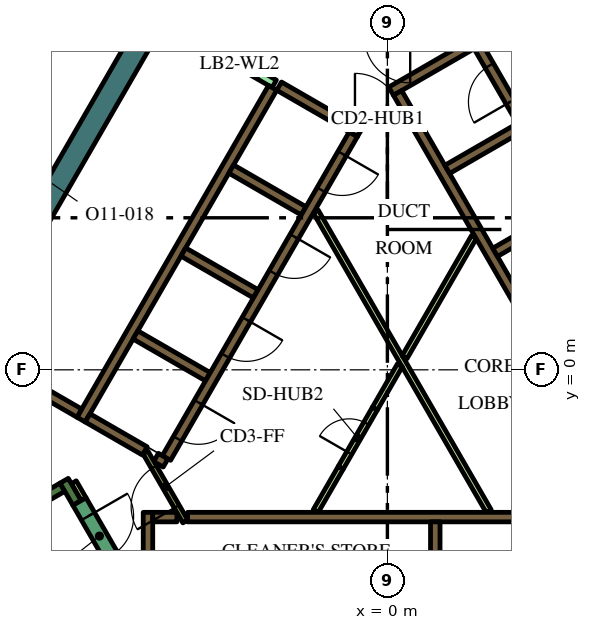
"""IFC4 building model, lengths in metres.
Left out: names, types, materials, properties, quantities, classifications, styles, units other than length and angle.
Written with IfcOpenShell. Run it as: python <this file> out.ifc"""

import sys

from ifc_helpers import new_model, si_unit, direction, frame, frame_2d, origin, place, context, subcontext, project, spatial, polyline, rectangle, outline, extrude, element, fill, save


model = new_model("IFC4")
c1 = context("Model", 3, precision=1e-05, world=origin(), true_north=direction((0.0, 1.0)))
c2 = subcontext(c1, "Body", "Model", "MODEL_VIEW")
j1 = project(units=[si_unit("LENGTHUNIT", "METRE"), si_unit("PLANEANGLEUNIT", "RADIAN")], contexts=[c1])
p1 = place(None, origin())
s1 = spatial("IfcSite", under=j1, at=p1, CompositionType="ELEMENT")
p2 = place(p1, origin())
s2 = spatial("IfcBuilding", under=s1, at=p2, CompositionType="ELEMENT")
p3 = place(p2, frame((0.0, 0.0, 275.4)))
s3 = spatial("IfcBuildingStorey", under=s2, at=p3, CompositionType="ELEMENT", Elevation=275.4)
p4 = place(p3, frame((1.989, 16.456, 0.0), z_axis=(0.0, 0.0, 1.0), x_axis=(0.49999102663, -0.8660305845, 0.0)))
e1 = element("IfcWall", 1, at=p4, inside=s3, PredefinedType="SOLIDWALL", context=c2, shape_type="SweptSolid", body=[
    extrude(rectangle(XDim=12.406, YDim=0.6, at=frame_2d((6.203, 0.0))), origin(), (0.0, 0.0, 1.0), 4.2),
])
p5 = place(p3, frame((-4.234, 12.566, 0.0), z_axis=(0.0, 0.0, 1.0), x_axis=(-0.499998841866, -0.866026072432, 0.0)))
e2 = element("IfcWall", 2, at=p5, inside=s3, PredefinedType="SOLIDWALL", context=c2, shape_type="SweptSolid", body=[
    extrude(rectangle(XDim=16.694, YDim=0.6, at=frame_2d((8.347, 0.0))), origin(), (0.0, 0.0, 1.0), 4.2),
])
p6 = place(p3, frame((-14.44, -6.49, 0.0), z_axis=(0.0, 0.0, 1.0), x_axis=(0.866022966069, 0.500004222222, 0.0)))
e3 = element("IfcWall", 3, at=p6, inside=s3, PredefinedType="SOLIDWALL", context=c2, shape_type="SweptSolid", body=[
    extrude(rectangle(XDim=6.8, YDim=0.25, at=frame_2d((3.4, 0.0))), origin(), (0.0, 0.0, 1.0), 4.2),
])
p7 = place(p3, frame((-8.168, -3.503, 0.0), z_axis=(0.0, 0.0, 1.0), x_axis=(-0.499952099219, 0.866053057547, 0.0)))
e4 = element("IfcWall", 4, at=p7, inside=s3, PredefinedType="SOLIDWALL", context=c2, shape_type="SweptSolid", body=[
    extrude(rectangle(XDim=0.675, YDim=0.25, at=frame_2d((0.337, 0.0))), origin(), (0.0, 0.0, 1.0), 4.2),
])
p8 = place(p3, frame((-5.259, -3.875, 0.0), z_axis=(0.0, 0.0, 1.0), x_axis=(1.0, 0.0, 0.0)))
e5 = element("IfcWall", 5, at=p8, inside=s3, PredefinedType="SOLIDWALL", context=c2, shape_type="SweptSolid", body=[
    extrude(rectangle(XDim=10.489, YDim=0.25, at=frame_2d((5.244, 0.0))), origin(), (0.0, 0.0, 1.0), 4.2),
])
p9 = place(p3, frame((1.26, -4.0, 0.0), z_axis=(0.0, 0.0, 1.0), x_axis=(0.0, -1.0, 0.0)))
e6 = element("IfcWall", 6, at=p9, inside=s3, PredefinedType="SOLIDWALL", context=c2, shape_type="SweptSolid", body=[
    extrude(rectangle(XDim=2.2, YDim=0.25, at=frame_2d((1.1, 0.0))), origin(), (0.0, 0.0, 1.0), 4.2),
])
p10 = place(p3, frame((-6.3, -7.125, 0.0), z_axis=(0.0, 0.0, 1.0), x_axis=(0.0, 1.0, 0.0)))
e7 = element("IfcWall", 7, at=p10, inside=s3, PredefinedType="SOLIDWALL", context=c2, shape_type="SweptSolid", body=[
    extrude(rectangle(XDim=3.375, YDim=0.25, at=frame_2d((1.687, 0.0))), origin(), (0.0, 0.0, 1.0), 4.2),
])
p11 = place(p3, frame((-6.175, -3.875, 0.0), z_axis=(0.0, 0.0, 1.0), x_axis=(1.0, 0.0, 0.0)))
e8 = element("IfcWall", 8, at=p11, inside=s3, PredefinedType="SOLIDWALL", context=c2, shape_type="SweptSolid", body=[
    extrude(rectangle(XDim=0.637, YDim=0.25, at=frame_2d((0.318, 0.0))), origin(), (0.0, 0.0, 1.0), 4.2),
])
p12 = place(p3, frame((3.1, 9.064, 0.0), z_axis=(0.0, 0.0, 1.0), x_axis=(-0.866033137035, -0.499986605379, 0.0)))
e9 = element("IfcWall", 9, at=p12, inside=s3, PredefinedType="SOLIDWALL", context=c2, shape_type="SweptSolid", body=[
    extrude(rectangle(XDim=3.467, YDim=0.25, at=frame_2d((1.733, 0.0))), origin(), (0.0, 0.0, 1.0), 4.2),
])
p13 = place(p3, frame((0.268, 7.285, 0.0), z_axis=(0.0, 0.0, 1.0), x_axis=(0.500098681536, -0.865968422476, 0.0)))
e10 = element("IfcWall", 10, at=p13, inside=s3, PredefinedType="SOLIDWALL", context=c2, shape_type="SweptSolid", body=[
    extrude(rectangle(XDim=0.636, YDim=0.25, at=frame_2d((0.318, 0.0))), origin(), (0.0, 0.0, 1.0), 4.2),
])
p14 = place(p3, frame((5.97, -2.591, 0.0), z_axis=(0.0, 0.0, 1.0), x_axis=(-0.499994469932, 0.866028596547, 0.0)))
e11 = element("IfcWall", 11, at=p14, inside=s3, PredefinedType="SOLIDWALL", context=c2, shape_type="SweptSolid", body=[
    extrude(rectangle(XDim=10.488, YDim=0.25, at=frame_2d((5.244, 0.0))), origin(), (0.0, 0.0, 1.0), 4.2),
])
p15 = place(p3, frame((1.574, 5.274, 0.0), z_axis=(0.0, 0.0, 1.0), x_axis=(0.866028486751, 0.499994660107, 0.0)))
e12 = element("IfcWall", 12, at=p15, inside=s3, PredefinedType="SOLIDWALL", context=c2, shape_type="SweptSolid", body=[
    extrude(rectangle(XDim=2.2, YDim=0.25, at=frame_2d((1.1, 0.0))), origin(), (0.0, 0.0, 1.0), 4.2),
])
p16 = place(p3, frame((2.834, 3.091, 0.0), z_axis=(0.0, 0.0, 1.0), x_axis=(0.866008176907, 0.50002983664, 0.0)))
e13 = element("IfcWall", 13, at=p16, inside=s3, PredefinedType="SOLIDWALL", context=c2, shape_type="SweptSolid", body=[
    extrude(rectangle(XDim=2.2, YDim=0.25, at=frame_2d((1.1, 0.0))), origin(), (0.0, 0.0, 1.0), 4.2),
])
p17 = place(p3, frame((-3.02, 7.419, 0.0), z_axis=(0.0, 0.0, 1.0), x_axis=(-0.500022956343, -0.866012149528, 0.0)))
e14 = element("IfcWall", 14, at=p17, inside=s3, PredefinedType="SOLIDWALL", context=c2, shape_type="SweptSolid", body=[
    extrude(rectangle(XDim=10.08, YDim=0.25, at=frame_2d((5.04, 0.0))), origin(), (0.0, 0.0, 1.0), 4.2),
])
p18 = place(p3, origin())
e15 = element("IfcWall", 15, at=p18, inside=s3, PredefinedType="SOLIDWALL", context=c2, shape_type="SweptSolid", body=[
    extrude(outline(polyline([(-2.912, 7.356), (-2.787, 7.573), (-1.232, 6.675), (-1.303, 6.675), (-1.304, 6.675), (-1.304, 6.675), (-1.304, 6.525), (-1.304, 6.525), (-1.303, 6.525), (-0.971, 6.525), (-0.665, 6.348), (-0.79, 6.132), (-1.007, 6.257), (-1.007, 6.257), (-2.912, 7.356)])), origin(), (0.0, 0.0, 1.0), 4.2),
])
for number, where, z_axis, x_axis in (
    (16, (-2.204, 4.182, 0.0), (0.0, 0.0, 1.0), (-0.866, 0.5, 0.0)),
    (17, (-5.369, 3.1, 0.0), (0.0, 0.0, 1.0), (0.866, -0.5, 0.0)),
    (18, (-4.724, -0.182, 0.0), (0.0, 0.0, 1.0), (-0.866, 0.5, 0.0)),
):
    element("IfcWall", number, at=place(p3, frame(where, z_axis=z_axis, x_axis=x_axis)), inside=s3, PredefinedType="SOLIDWALL", context=c2, shape_type="SweptSolid", body=[
        extrude(rectangle(XDim=2.2, YDim=0.25, at=frame_2d((1.1, 0.0))), origin(), (0.0, 0.0, 1.0), 4.2),
    ])
p19 = place(p3, frame((-6.088, -2.305, 0.0), z_axis=(0.0, 0.0, 1.0), x_axis=(0.866059450854, -0.499941024108, 0.0)))
e19 = element("IfcWall", 19, at=p19, inside=s3, PredefinedType="SOLIDWALL", context=c2, shape_type="SweptSolid", body=[
    extrude(rectangle(XDim=0.29, YDim=0.25, at=frame_2d((0.145, 0.0))), origin(), (0.0, 0.0, 1.0), 4.2),
])
p20 = place(p3, frame((-7.889, -1.265, 0.0), z_axis=(0.0, 0.0, 1.0), x_axis=(0.865986741702, -0.500066958712, 0.0)))
e20 = element("IfcWall", 20, at=p20, inside=s3, PredefinedType="SOLIDWALL", context=c2, shape_type="SweptSolid", body=[
    extrude(rectangle(XDim=1.738, YDim=0.25, at=frame_2d((0.869, 0.0))), origin(), (0.0, 0.0, 1.0), 4.2),
])
p21 = place(p3, frame((-8.106, -1.14, 0.0), z_axis=(0.0, 0.0, 1.0), x_axis=(-0.866008981251, 0.500028443584, 0.0)))
e21 = element("IfcWall", 21, at=p21, inside=s3, PredefinedType="SOLIDWALL", context=c2, shape_type="SweptSolid", body=[
    extrude(rectangle(XDim=3.2, YDim=0.25, at=frame_2d((1.6, 0.0))), origin(), (0.0, 0.0, 1.0), 4.2),
])
p22 = place(p3, frame((-8.252, -2.958, 0.0), z_axis=(0.0, 0.0, 1.0), x_axis=(0.500174715838, -0.865924508047, 0.0)))
e22 = element("IfcWall", 22, at=p22, inside=s3, PredefinedType="PARTITIONING", context=c2, shape_type="SweptSolid", body=[
    extrude(rectangle(XDim=0.514, YDim=0.15, at=frame_2d((0.257, 0.0))), origin(), (0.0, 0.0, 1.0), 3.55),
])
p23 = place(p3, frame((-1.887, 4.168, 0.0), z_axis=(0.0, 0.0, 1.0), x_axis=(0.499997069472, -0.866027095719, 0.0)))
e23 = element("IfcWall", 23, at=p23, inside=s3, PredefinedType="PARTITIONING", context=c2, shape_type="SweptSolid", body=[
    extrude(rectangle(XDim=9.106, YDim=0.15, at=frame_2d((4.553, 0.0))), origin(), (0.0, 0.0, 1.0), 3.55),
])
p24 = place(p3, frame((-0.329, -1.021, 0.0), z_axis=(0.0, 0.0, 1.0), x_axis=(0.500033191285, 0.866006239939, 0.0)))
e24 = element("IfcWall", 24, at=p24, inside=s3, PredefinedType="PARTITIONING", context=c2, shape_type="SweptSolid", body=[
    extrude(rectangle(XDim=1.315, YDim=0.15, at=frame_2d((0.657, 0.0))), origin(), (0.0, 0.0, 1.0), 3.55),
])
p25 = place(p3, frame((2.277, 3.493, 0.0), z_axis=(0.0, 0.0, 1.0), x_axis=(-0.499994550825, -0.866028549844, 0.0)))
e25 = element("IfcWall", 25, at=p25, inside=s3, PredefinedType="PARTITIONING", context=c2, shape_type="SweptSolid", body=[
    extrude(rectangle(XDim=3.65, YDim=0.15, at=frame_2d((1.825, 0.0))), origin(), (0.0, 0.0, 1.0), 3.55),
])
p26 = place(p3, frame((-1.887, -3.718, 0.0), z_axis=(0.0, 0.0, 1.0), x_axis=(0.500033191285, 0.866006239939, 0.0)))
e26 = element("IfcWall", 26, at=p26, inside=s3, PredefinedType="PARTITIONING", context=c2, shape_type="SweptSolid", body=[
    extrude(rectangle(XDim=1.315, YDim=0.15, at=frame_2d((0.657, 0.0))), origin(), (0.0, 0.0, 1.0), 3.55),
])
p27 = place(p3, frame((8.565, -2.185, 0.0), z_axis=(0.0, 0.0, 1.0), x_axis=(-0.499997954832, 0.866026584559, 0.0)))
e27 = element("IfcWall", 27, at=p27, inside=s3, PredefinedType="SOLIDWALL", context=c2, shape_type="SweptSolid", body=[
    extrude(rectangle(XDim=12.35, YDim=0.25, at=frame_2d((6.175, 0.0))), origin(), (0.0, 0.0, 1.0), 4.2),
])
p28 = place(p27, frame((0.685, 0.0, 0.0)))
e28 = element("IfcOpeningElement", 28, at=p28, cuts=e27, PredefinedType="OPENING", context=c2, shape_type="SweptSolid", body=[
    extrude(rectangle(XDim=0.9, YDim=2.1, at=frame_2d((0.45, 1.05))), frame((0.0, 0.135, 0.0), z_axis=(0.0, -1.0, 0.0), x_axis=(1.0, 0.0, 0.0)), (0.0, 0.0, 1.0), 0.27),
])
p29 = place(p27, frame((3.105, 0.0, 0.0)))
e29 = element("IfcOpeningElement", 29, at=p29, cuts=e27, PredefinedType="OPENING", context=c2, shape_type="SweptSolid", body=[
    extrude(rectangle(XDim=1.1, YDim=2.1, at=frame_2d((0.55, 1.05))), frame((0.0, 0.135, 0.0), z_axis=(0.0, -1.0, 0.0), x_axis=(1.0, 0.0, 0.0)), (0.0, 0.0, 1.0), 0.27),
])
p30 = place(p27, frame((5.625, 0.0, 0.0)))
e30 = element("IfcOpeningElement", 30, at=p30, cuts=e27, PredefinedType="OPENING", context=c2, shape_type="SweptSolid", body=[
    extrude(rectangle(XDim=1.1, YDim=2.1, at=frame_2d((0.55, 1.05))), frame((0.0, 0.135, 0.0), z_axis=(0.0, -1.0, 0.0), x_axis=(1.0, 0.0, 0.0)), (0.0, 0.0, 1.0), 0.27),
])
p31 = place(p27, frame((8.145, 0.0, 0.0)))
e31 = element("IfcOpeningElement", 31, at=p31, cuts=e27, PredefinedType="OPENING", context=c2, shape_type="SweptSolid", body=[
    extrude(rectangle(XDim=1.1, YDim=2.1, at=frame_2d((0.55, 1.05))), frame((0.0, 0.135, 0.0), z_axis=(0.0, -1.0, 0.0), x_axis=(1.0, 0.0, 0.0)), (0.0, 0.0, 1.0), 0.27),
])
p32 = place(p27, frame((10.665, 0.0, 0.0)))
e32 = element("IfcOpeningElement", 32, at=p32, cuts=e27, PredefinedType="OPENING", context=c2, shape_type="SweptSolid", body=[
    extrude(rectangle(XDim=1.1, YDim=2.1, at=frame_2d((0.55, 1.05))), frame((0.0, 0.135, 0.0), z_axis=(0.0, -1.0, 0.0), x_axis=(1.0, 0.0, 0.0)), (0.0, 0.0, 1.0), 0.27),
])
p33 = place(p3, frame((-0.898, 6.194, 0.0), z_axis=(0.0, 0.0, 1.0), x_axis=(-0.499996202215, -0.866027596426, 0.0)))
e33 = element("IfcWall", 33, at=p33, inside=s3, PredefinedType="SOLIDWALL", context=c2, shape_type="SweptSolid", body=[
    extrude(rectangle(XDim=9.83, YDim=0.25, at=frame_2d((4.915, 0.0))), origin(), (0.0, 0.0, 1.0), 4.2),
])
p34 = place(p33, frame((0.585, 0.0, 0.0)))
e34 = element("IfcOpeningElement", 34, at=p34, cuts=e33, PredefinedType="OPENING", context=c2, shape_type="SweptSolid", body=[
    extrude(rectangle(XDim=1.1, YDim=2.1, at=frame_2d((0.55, 1.05))), frame((0.0, 0.135, 0.0), z_axis=(0.0, -1.0, 0.0), x_axis=(1.0, 0.0, 0.0)), (0.0, 0.0, 1.0), 0.27),
])
p35 = place(p33, frame((3.105, 0.0, 0.0)))
e35 = element("IfcOpeningElement", 35, at=p35, cuts=e33, PredefinedType="OPENING", context=c2, shape_type="SweptSolid", body=[
    extrude(rectangle(XDim=1.1, YDim=2.1, at=frame_2d((0.55, 1.05))), frame((0.0, 0.135, 0.0), z_axis=(0.0, -1.0, 0.0), x_axis=(1.0, 0.0, 0.0)), (0.0, 0.0, 1.0), 0.27),
])
p36 = place(p33, frame((5.625, 0.0, 0.0)))
e36 = element("IfcOpeningElement", 36, at=p36, cuts=e33, PredefinedType="OPENING", context=c2, shape_type="SweptSolid", body=[
    extrude(rectangle(XDim=1.1, YDim=2.1, at=frame_2d((0.55, 1.05))), frame((0.0, 0.135, 0.0), z_axis=(0.0, -1.0, 0.0), x_axis=(1.0, 0.0, 0.0)), (0.0, 0.0, 1.0), 0.27),
])
p37 = place(p33, frame((8.145, 0.0, 0.0)))
e37 = element("IfcOpeningElement", 37, at=p37, cuts=e33, PredefinedType="OPENING", context=c2, shape_type="SweptSolid", body=[
    extrude(rectangle(XDim=1.1, YDim=2.1, at=frame_2d((0.55, 1.05))), frame((0.0, 0.135, 0.0), z_axis=(0.0, -1.0, 0.0), x_axis=(1.0, 0.0, 0.0)), (0.0, 0.0, 1.0), 0.27),
])
p38 = place(p3, frame((-8.103, -3.466, 0.0), z_axis=(0.0, 0.0, 1.0), x_axis=(0.500078061341, -0.865980330357, 0.0)))
e38 = element("IfcWall", 38, at=p38, inside=s3, PredefinedType="SOLIDWALL", context=c2, shape_type="SweptSolid", body=[
    extrude(rectangle(XDim=2.1, YDim=0.4, at=frame_2d((1.05, 0.0))), origin(), (0.0, 0.0, 1.0), 4.2),
])
p39 = place(p38, frame((0.45, 0.0, 0.0)))
e39 = element("IfcOpeningElement", 39, at=p39, cuts=e38, PredefinedType="OPENING", context=c2, shape_type="SweptSolid", body=[
    extrude(rectangle(XDim=1.2, YDim=2.1, at=frame_2d((0.6, 1.05))), frame((0.0, 0.21, 0.0), z_axis=(0.0, -1.0, 0.0), x_axis=(1.0, 0.0, 0.0)), (0.0, 0.0, 1.0), 0.42),
])
p40 = place(p3, frame((-1.303, 6.6, 0.0), z_axis=(0.0, 0.0, 1.0), x_axis=(1.0, 0.0, 0.0)))
e40 = element("IfcWall", 40, at=p40, inside=s3, PredefinedType="PARTITIONING", context=c2, shape_type="SweptSolid", body=[
    extrude(rectangle(XDim=2.1, YDim=0.15, at=frame_2d((1.05, 0.0))), origin(), (0.0, 0.0, 1.0), 4.2),
])
p41 = place(p40, frame((0.45, 0.0, 0.0)))
e41 = element("IfcOpeningElement", 41, at=p41, cuts=e40, PredefinedType="OPENING", context=c2, shape_type="SweptSolid", body=[
    extrude(rectangle(XDim=1.2, YDim=2.1, at=frame_2d((0.6, 1.05))), frame((0.0, 0.085, 0.0), z_axis=(0.0, -1.0, 0.0), x_axis=(1.0, 0.0, 0.0)), (0.0, 0.0, 1.0), 0.17),
])
p42 = place(p3, frame((-5.317, -3.99, 0.0), z_axis=(0.0, 0.0, 1.0), x_axis=(-0.500027713859, 0.866009402589, 0.0)))
e42 = element("IfcWall", 42, at=p42, inside=s3, PredefinedType="PARTITIONING", context=c2, shape_type="SweptSolid", body=[
    extrude(rectangle(XDim=2.1, YDim=0.15, at=frame_2d((1.05, 0.0))), origin(), (0.0, 0.0, 1.0), 4.2),
])
p43 = place(p42, frame((0.45, 0.0, 0.0)))
e43 = element("IfcOpeningElement", 43, at=p43, cuts=e42, PredefinedType="OPENING", context=c2, shape_type="SweptSolid", body=[
    extrude(rectangle(XDim=1.2, YDim=2.1, at=frame_2d((0.6, 1.05))), frame((0.0, 0.085, 0.0), z_axis=(0.0, -1.0, 0.0), x_axis=(1.0, 0.0, 0.0)), (0.0, 0.0, 1.0), 0.17),
])
p44 = place(p3, frame((-4.796, 8.575, 0.0), z_axis=(0.0, 0.0, 1.0), x_axis=(0.866009402589, -0.500027713859, 0.0)))
e44 = element("IfcWall", 44, at=p44, inside=s3, PredefinedType="PARTITIONING", context=c2, shape_type="SweptSolid", body=[
    extrude(rectangle(XDim=2.1, YDim=0.226, at=frame_2d((1.05, 0.0))), origin(), (0.0, 0.0, 1.0), 3.55),
])
p45 = place(p44, frame((0.45, 0.0, 0.0)))
e45 = element("IfcOpeningElement", 45, at=p45, cuts=e44, PredefinedType="OPENING", context=c2, shape_type="SweptSolid", body=[
    extrude(rectangle(XDim=1.2, YDim=2.1, at=frame_2d((0.6, 1.05))), frame((0.0, 0.123, 0.0), z_axis=(0.0, -1.0, 0.0), x_axis=(1.0, 0.0, 0.0)), (0.0, 0.0, 1.0), 0.246),
])
p46 = place(p3, frame((-1.229, -2.579, 0.0), z_axis=(0.0, 0.0, 1.0), x_axis=(0.500062916607, 0.865989075817, 0.0)))
e46 = element("IfcWall", 46, at=p46, inside=s3, PredefinedType="PARTITIONING", context=c2, shape_type="SweptSolid", body=[
    extrude(rectangle(XDim=1.8, YDim=0.15, at=frame_2d((0.9, 0.0))), origin(), (0.0, 0.0, 1.0), 3.55),
])
p47 = place(p46, frame((0.45, 0.0, 0.0)))
e47 = element("IfcOpeningElement", 47, at=p47, cuts=e46, PredefinedType="OPENING", context=c2, shape_type="SweptSolid", body=[
    extrude(rectangle(XDim=0.9, YDim=2.1, at=frame_2d((0.45, 1.05))), frame((0.0, 0.085, 0.0), z_axis=(0.0, -1.0, 0.0), x_axis=(1.0, 0.0, 0.0)), (0.0, 0.0, 1.0), 0.17),
])
p48 = place(p3, frame((-7.436, 11.221, 0.0), z_axis=(0.0, 0.0, 1.0), x_axis=(-0.49999894854, -0.866026010844, 0.0)))
e48 = element("IfcWall", 48, at=p48, inside=s3, PredefinedType="PARTITIONING", context=c2, shape_type="SweptSolid", body=[
    extrude(rectangle(XDim=12.0, YDim=0.2, at=frame_2d((6.0, 0.0))), origin(), (0.0, 0.0, 1.0), 3.55),
])
p49 = place(p48, frame((5.5, 0.0, 0.0)))
e49 = element("IfcOpeningElement", 49, at=p49, cuts=e48, PredefinedType="OPENING", context=c2, shape_type="SweptSolid", body=[
    extrude(rectangle(XDim=1.0, YDim=2.1, at=frame_2d((0.5, 1.05))), frame((0.0, 0.11, 0.0), z_axis=(0.0, -1.0, 0.0), x_axis=(1.0, 0.0, 0.0)), (0.0, 0.0, 1.0), 0.22),
])
p50 = place(p32, origin())
e50 = element("IfcDoor", 50, at=p50, inside=s3, OperationType="DOUBLE_DOOR_SLIDING", PredefinedType="DOOR", context=c2, shape_type="SweptSolid", body=[
    extrude(rectangle(XDim=1.1, YDim=2.1, at=frame_2d((0.55, 1.05))), frame((0.0, 0.025, 0.0), z_axis=(0.0, -1.0, 0.0), x_axis=(1.0, 0.0, 0.0)), (0.0, 0.0, 1.0), 0.05),
])
fill(e32, e50)
p51 = place(p34, origin())
e51 = element("IfcDoor", 51, at=p51, inside=s3, OperationType="DOUBLE_DOOR_SLIDING", PredefinedType="DOOR", context=c2, shape_type="SweptSolid", body=[
    extrude(rectangle(XDim=1.1, YDim=2.1, at=frame_2d((0.55, 1.05))), frame((0.0, 0.025, 0.0), z_axis=(0.0, -1.0, 0.0), x_axis=(1.0, 0.0, 0.0)), (0.0, 0.0, 1.0), 0.05),
])
fill(e34, e51)
p52 = place(p35, origin())
e52 = element("IfcDoor", 52, at=p52, inside=s3, OperationType="DOUBLE_DOOR_SLIDING", PredefinedType="DOOR", context=c2, shape_type="SweptSolid", body=[
    extrude(rectangle(XDim=1.1, YDim=2.1, at=frame_2d((0.55, 1.05))), frame((0.0, 0.025, 0.0), z_axis=(0.0, -1.0, 0.0), x_axis=(1.0, 0.0, 0.0)), (0.0, 0.0, 1.0), 0.05),
])
fill(e35, e52)
p53 = place(p36, origin())
e53 = element("IfcDoor", 53, at=p53, inside=s3, OperationType="DOUBLE_DOOR_SLIDING", PredefinedType="DOOR", context=c2, shape_type="SweptSolid", body=[
    extrude(rectangle(XDim=1.1, YDim=2.1, at=frame_2d((0.55, 1.05))), frame((0.0, 0.025, 0.0), z_axis=(0.0, -1.0, 0.0), x_axis=(1.0, 0.0, 0.0)), (0.0, 0.0, 1.0), 0.05),
])
fill(e36, e53)
p54 = place(p37, origin())
e54 = element("IfcDoor", 54, at=p54, inside=s3, OperationType="DOUBLE_DOOR_SLIDING", PredefinedType="DOOR", context=c2, shape_type="SweptSolid", body=[
    extrude(rectangle(XDim=1.1, YDim=2.1, at=frame_2d((0.55, 1.05))), frame((0.0, 0.025, 0.0), z_axis=(0.0, -1.0, 0.0), x_axis=(1.0, 0.0, 0.0)), (0.0, 0.0, 1.0), 0.05),
])
fill(e37, e54)
p55 = place(p39, origin())
e55 = element("IfcDoor", 55, at=p55, inside=s3, OperationType="SINGLE_SWING_LEFT", PredefinedType="DOOR", context=c2, shape_type="SweptSolid", body=[
    extrude(rectangle(XDim=1.2, YDim=2.1, at=frame_2d((0.6, 1.05))), frame((0.0, 0.025, 0.0), z_axis=(0.0, -1.0, 0.0), x_axis=(1.0, 0.0, 0.0)), (0.0, 0.0, 1.0), 0.05),
])
fill(e39, e55)
p56 = place(p41, origin())
e56 = element("IfcDoor", 56, at=p56, inside=s3, OperationType="SINGLE_SWING_LEFT", PredefinedType="DOOR", context=c2, shape_type="SweptSolid", body=[
    extrude(rectangle(XDim=1.2, YDim=2.1, at=frame_2d((0.6, 1.05))), frame((0.0, 0.025, 0.0), z_axis=(0.0, -1.0, 0.0), x_axis=(1.0, 0.0, 0.0)), (0.0, 0.0, 1.0), 0.05),
])
fill(e41, e56)
p57 = place(p43, origin())
e57 = element("IfcDoor", 57, at=p57, inside=s3, OperationType="SINGLE_SWING_LEFT", PredefinedType="DOOR", context=c2, shape_type="SweptSolid", body=[
    extrude(rectangle(XDim=1.2, YDim=2.1, at=frame_2d((0.6, 1.05))), frame((0.0, 0.025, 0.0), z_axis=(0.0, -1.0, 0.0), x_axis=(1.0, 0.0, 0.0)), (0.0, 0.0, 1.0), 0.05),
])
fill(e43, e57)
p58 = place(p45, origin())
e58 = element("IfcDoor", 58, at=p58, inside=s3, OperationType="SINGLE_SWING_LEFT", PredefinedType="DOOR", context=c2, shape_type="SweptSolid", body=[
    extrude(rectangle(XDim=1.2, YDim=2.1, at=frame_2d((0.6, 1.05))), frame((0.0, 0.025, 0.0), z_axis=(0.0, -1.0, 0.0), x_axis=(1.0, 0.0, 0.0)), (0.0, 0.0, 1.0), 0.05),
])
fill(e45, e58)
p59 = place(p47, origin())
e59 = element("IfcDoor", 59, at=p59, inside=s3, OperationType="SINGLE_SWING_LEFT", PredefinedType="DOOR", context=c2, shape_type="SweptSolid", body=[
    extrude(rectangle(XDim=0.9, YDim=2.1, at=frame_2d((0.45, 1.05))), frame((0.0, 0.025, 0.0), z_axis=(0.0, -1.0, 0.0), x_axis=(1.0, 0.0, 0.0)), (0.0, 0.0, 1.0), 0.05),
])
fill(e47, e59)
save(model, sys.argv[1])
